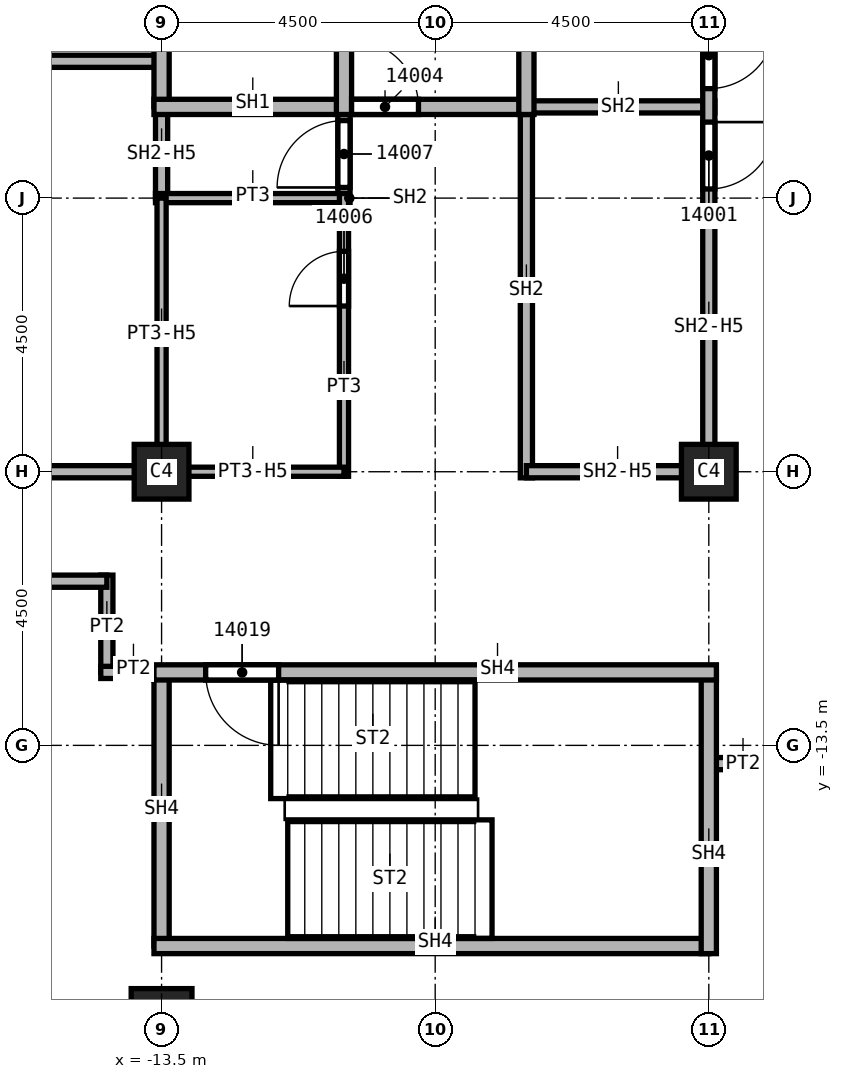
"""IFC4 building model, lengths in metres.
Left out: names, types, materials, properties, quantities, classifications, styles, units other than length and angle.
Written with IfcOpenShell. Run it as: python <this file> out.ifc"""

import sys

from ifc_helpers import new_model, si_unit, direction, frame, frame_2d, origin, origin_2d, place, context, subcontext, project, spatial, rectangle, extrude, element, fill, save


model = new_model("IFC4")
c1 = context("Model", 3, precision=1e-05, world=origin(), true_north=direction((0.0, 1.0)))
c2 = subcontext(c1, "Body", "Model", "MODEL_VIEW")
j1 = project(units=[si_unit("LENGTHUNIT", "METRE"), si_unit("PLANEANGLEUNIT", "RADIAN")], contexts=[c1])
p1 = place(None, origin())
s1 = spatial("IfcSite", under=j1, at=p1, CompositionType="ELEMENT")
p2 = place(p1, origin())
s2 = spatial("IfcBuilding", under=s1, at=p2, CompositionType="ELEMENT")
p3 = place(p2, frame((0.0, 0.0, 224.0)))
s3 = spatial("IfcBuildingStorey", under=s2, at=p3, CompositionType="ELEMENT", Elevation=224.0)
p4 = place(p3, frame((-13.5, -18.0, 0.0), z_axis=(0.0, 0.0, 1.0), x_axis=(1.0, 0.0, 0.0)))
e1 = element("IfcColumn", 1, at=p4, inside=s3, PredefinedType="COLUMN", context=c2, shape_type="SweptSolid", body=[
    extrude(rectangle(XDim=1.0, YDim=1.0, at=origin_2d()), origin(), (0.0, 0.0, 1.0), 3.72),
])
for number, where, z_axis, x_axis in (
    (2, (-4.5, -9.0, 0.0), (0.0, 0.0, 1.0), (1.0, 0.0, 0.0)),
    (3, (-13.5, -9.0, 0.0), (0.0, 0.0, 1.0), (1.0, 0.0, 0.0)),
):
    element("IfcColumn", number, at=place(p3, frame(where, z_axis=z_axis, x_axis=x_axis)), inside=s3, PredefinedType="COLUMN", context=c2, shape_type="SweptSolid", body=[
        extrude(rectangle(XDim=0.9, YDim=0.9, at=origin_2d()), origin(), (0.0, 0.0, 1.0), 3.72),
    ])
for number, where, z_axis, x_axis in (
    (4, (-18.0, -9.0, 0.0), (0.0, 0.0, 1.0), (1.0, 0.0, 0.0)),
    (5, (-18.0, -2.25, 0.0), (0.0, 0.0, 1.0), (1.0, 0.0, 0.0)),
):
    element("IfcWall", number, at=place(p3, frame(where, z_axis=z_axis, x_axis=x_axis)), inside=s3, PredefinedType="PARTITIONING", context=c2, shape_type="SweptSolid", body=[
        extrude(rectangle(XDim=4.5, YDim=0.2, at=frame_2d((2.25, 0.0))), origin(), (0.0, 0.0, 1.0), 3.72),
    ])
p5 = place(p3, frame((-14.4, -12.3, 0.0), z_axis=(0.0, 0.0, 1.0), x_axis=(0.0, 1.0, 0.0)))
e6 = element("IfcWall", 6, at=p5, inside=s3, PredefinedType="PARTITIONING", context=c2, shape_type="SweptSolid", body=[
    extrude(rectangle(XDim=1.6, YDim=0.2, at=frame_2d((0.8, 0.0))), origin(), (0.0, 0.0, 1.0), 3.72),
])
p6 = place(p3, frame((-14.4, -10.8, 0.0), z_axis=(0.0, 0.0, 1.0), x_axis=(-1.0, 0.0, 0.0)))
e7 = element("IfcWall", 7, at=p6, inside=s3, PredefinedType="PARTITIONING", context=c2, shape_type="SweptSolid", body=[
    extrude(rectangle(XDim=3.6, YDim=0.2, at=frame_2d((1.8, 0.0))), origin(), (0.0, 0.0, 1.0), 3.72),
])
p7 = place(p3, frame((-13.375, -12.3, 0.0), z_axis=(0.0, 0.0, 1.0), x_axis=(-1.0, 0.0, 0.0)))
e8 = element("IfcWall", 8, at=p7, inside=s3, PredefinedType="PARTITIONING", context=c2, shape_type="SweptSolid", body=[
    extrude(rectangle(XDim=1.125, YDim=0.2, at=frame_2d((0.562, 0.0))), origin(), (0.0, 0.0, 1.0), 3.72),
])
p8 = place(p3, frame((-3.5, -13.8, 0.0), z_axis=(0.0, 0.0, 1.0), x_axis=(-1.0, 0.0, 0.0)))
e9 = element("IfcWall", 9, at=p8, inside=s3, PredefinedType="PARTITIONING", context=c2, shape_type="SweptSolid", body=[
    extrude(rectangle(XDim=1.0, YDim=0.2, at=frame_2d((0.5, 0.0))), origin(), (0.0, 0.0, 1.0), 3.72),
])
p9 = place(p3, frame((-13.5, -4.5, 0.0), z_axis=(0.0, 0.0, 1.0), x_axis=(0.0, 1.0, 0.0)))
e10 = element("IfcWall", 10, at=p9, inside=s3, PredefinedType="SOLIDWALL", context=c2, shape_type="SweptSolid", body=[
    extrude(rectangle(XDim=1.5, YDim=0.2, at=frame_2d((0.75, 0.0))), origin(), (0.0, 0.0, 1.0), 2.958),
])
p10 = place(p3, frame((-10.5, -4.575, 0.0), z_axis=(0.0, 0.0, 1.0), x_axis=(0.0, 1.0, 0.0)))
e11 = element("IfcWall", 11, at=p10, inside=s3, PredefinedType="SOLIDWALL", context=c2, shape_type="SweptSolid", body=[
    extrude(rectangle(XDim=1.7, YDim=0.2, at=frame_2d((0.85, 0.0))), origin(), (0.0, 0.0, 1.0), 3.72),
])
p11 = place(p10, frame((0.25, 0.0, 0.0)))
e12 = element("IfcOpeningElement", 12, at=p11, cuts=e11, PredefinedType="OPENING", context=c2, shape_type="SweptSolid", body=[
    extrude(rectangle(XDim=1.1, YDim=2.1, at=frame_2d((0.55, 1.05))), frame((0.0, 0.1, 0.0), z_axis=(0.0, -1.0, 0.0), x_axis=(1.0, 0.0, 0.0)), (0.0, 0.0, 1.0), 0.2),
])
p12 = place(p3, frame((-7.625, -3.0, 0.0), z_axis=(0.0, 0.0, 1.0), x_axis=(1.0, 0.0, 0.0)))
e13 = element("IfcWall", 13, at=p12, inside=s3, PredefinedType="SOLIDWALL", context=c2, shape_type="SweptSolid", body=[
    extrude(rectangle(XDim=3.225, YDim=0.2, at=frame_2d((1.613, 0.0))), origin(), (0.0, 0.0, 1.0), 3.72),
])
p13 = place(p3, frame((-7.5, -9.1, 0.0), z_axis=(0.0, 0.0, 1.0), x_axis=(0.0, 1.0, 0.0)))
e14 = element("IfcWall", 14, at=p13, inside=s3, PredefinedType="SOLIDWALL", context=c2, shape_type="SweptSolid", body=[
    extrude(rectangle(XDim=6.225, YDim=0.2, at=frame_2d((3.113, 0.0))), origin(), (0.0, 0.0, 1.0), 3.72),
])
p14 = place(p3, frame((-4.5, -9.0, 0.0), z_axis=(0.0, 0.0, 1.0), x_axis=(-1.0, 0.0, 0.0)))
e15 = element("IfcWall", 15, at=p14, inside=s3, PredefinedType="SOLIDWALL", context=c2, shape_type="SweptSolid", body=[
    extrude(rectangle(XDim=3.0, YDim=0.2, at=frame_2d((1.5, 0.0))), origin(), (0.0, 0.0, 1.0), 2.958),
])
p15 = place(p3, frame((-4.5, 0.0, 0.0), z_axis=(0.0, 0.0, 1.0), x_axis=(0.0, -1.0, 0.0)))
e16 = element("IfcWall", 16, at=p15, inside=s3, PredefinedType="SOLIDWALL", context=c2, shape_type="SweptSolid", body=[
    extrude(rectangle(XDim=9.1, YDim=0.2, at=frame_2d((4.55, 0.0))), origin(), (0.0, 0.0, 1.0), 2.958),
])
p16 = place(p15, frame((3.25, 0.0, 0.0)))
e17 = element("IfcOpeningElement", 17, at=p16, cuts=e16, PredefinedType="OPENING", context=c2, shape_type="SweptSolid", body=[
    extrude(rectangle(XDim=1.1, YDim=2.1, at=frame_2d((0.55, 1.05))), frame((0.0, 0.1, 0.0), z_axis=(0.0, -1.0, 0.0), x_axis=(1.0, 0.0, 0.0)), (0.0, 0.0, 1.0), 0.2),
])
p17 = place(p15, frame((1.6, 0.0, 0.0)))
e18 = element("IfcOpeningElement", 18, at=p17, cuts=e16, PredefinedType="OPENING", context=c2, shape_type="SweptSolid", body=[
    extrude(rectangle(XDim=1.1, YDim=2.1, at=frame_2d((0.55, 1.05))), frame((0.0, 0.1, 0.0), z_axis=(0.0, -1.0, 0.0), x_axis=(1.0, 0.0, 0.0)), (0.0, 0.0, 1.0), 0.2),
])
p18 = place(p3, frame((-13.5, -3.0, 0.0), z_axis=(0.0, 0.0, 1.0), x_axis=(0.0, 1.0, 0.0)))
e19 = element("IfcWall", 19, at=p18, inside=s3, PredefinedType="SOLIDWALL", context=c2, shape_type="SweptSolid", body=[
    extrude(rectangle(XDim=6.0, YDim=0.25, at=frame_2d((3.0, 0.0))), origin(), (0.0, 0.0, 1.0), 2.958),
])
p19 = place(p3, frame((-13.625, -3.0, 0.0), z_axis=(0.0, 0.0, 1.0), x_axis=(1.0, 0.0, 0.0)))
e20 = element("IfcWall", 20, at=p19, inside=s3, PredefinedType="SOLIDWALL", context=c2, shape_type="SweptSolid", body=[
    extrude(rectangle(XDim=6.125, YDim=0.25, at=frame_2d((3.062, 0.0))), origin(), (0.0, 0.0, 1.0), 3.72),
])
p20 = place(p19, frame((3.25, 0.0, 0.0)))
e21 = element("IfcOpeningElement", 21, at=p20, cuts=e20, PredefinedType="OPENING", context=c2, shape_type="SweptSolid", body=[
    extrude(rectangle(XDim=1.1, YDim=2.1, at=frame_2d((0.55, 1.05))), frame((0.0, 0.125, 0.0), z_axis=(0.0, -1.0, 0.0), x_axis=(1.0, 0.0, 0.0)), (0.0, 0.0, 1.0), 0.25),
])
p21 = place(p3, frame((-10.5, -3.125, 0.0), z_axis=(0.0, 0.0, 1.0), x_axis=(0.0, 1.0, 0.0)))
e22 = element("IfcWall", 22, at=p21, inside=s3, PredefinedType="SOLIDWALL", context=c2, shape_type="SweptSolid", body=[
    extrude(rectangle(XDim=6.25, YDim=0.25, at=frame_2d((3.125, 0.0))), origin(), (0.0, 0.0, 1.0), 3.72),
])
p22 = place(p21, frame((1.075, 0.0, 0.0)))
e23 = element("IfcOpeningElement", 23, at=p22, cuts=e22, PredefinedType="OPENING", context=c2, shape_type="SweptSolid", body=[
    extrude(rectangle(XDim=1.1, YDim=2.1, at=frame_2d((0.55, 1.05))), frame((0.0, 0.125, 0.0), z_axis=(0.0, -1.0, 0.0), x_axis=(1.0, 0.0, 0.0)), (0.0, 0.0, 1.0), 0.25),
])
p23 = place(p21, frame((4.075, 0.0, 0.0)))
e24 = element("IfcOpeningElement", 24, at=p23, cuts=e22, PredefinedType="OPENING", context=c2, shape_type="SweptSolid", body=[
    extrude(rectangle(XDim=1.1, YDim=2.1, at=frame_2d((0.55, 1.05))), frame((0.0, 0.125, 0.0), z_axis=(0.0, -1.0, 0.0), x_axis=(1.0, 0.0, 0.0)), (0.0, 0.0, 1.0), 0.25),
])
p24 = place(p3, frame((-7.5, -3.125, 0.0), z_axis=(0.0, 0.0, 1.0), x_axis=(0.0, 1.0, 0.0)))
e25 = element("IfcWall", 25, at=p24, inside=s3, PredefinedType="SOLIDWALL", context=c2, shape_type="SweptSolid", body=[
    extrude(rectangle(XDim=9.125, YDim=0.25, at=frame_2d((4.562, 0.0))), origin(), (0.0, 0.0, 1.0), 3.72),
])
p25 = place(p3, frame((-13.5, -16.8, 0.0), z_axis=(0.0, 0.0, 1.0), x_axis=(0.0, 1.0, 0.0)))
e26 = element("IfcWall", 26, at=p25, inside=s3, PredefinedType="SOLIDWALL", context=c2, shape_type="SweptSolid", body=[
    extrude(rectangle(XDim=4.5, YDim=0.25, at=frame_2d((2.25, 0.0))), origin(), (0.0, 0.0, 1.0), 3.72),
])
p26 = place(p3, frame((-4.5, -16.8, 0.0), z_axis=(0.0, 0.0, 1.0), x_axis=(-1.0, 0.0, 0.0)))
e27 = element("IfcWall", 27, at=p26, inside=s3, PredefinedType="SOLIDWALL", context=c2, shape_type="SweptSolid", body=[
    extrude(rectangle(XDim=9.125, YDim=0.25, at=frame_2d((4.562, 0.0))), origin(), (0.0, 0.0, 1.0), 3.72),
])
p27 = place(p3, frame((-4.5, -12.3, 0.0), z_axis=(0.0, 0.0, 1.0), x_axis=(0.0, -1.0, 0.0)))
e28 = element("IfcWall", 28, at=p27, inside=s3, PredefinedType="SOLIDWALL", context=c2, shape_type="SweptSolid", body=[
    extrude(rectangle(XDim=4.625, YDim=0.25, at=frame_2d((2.312, 0.0))), origin(), (0.0, 0.0, 1.0), 3.72),
])
p28 = place(p3, frame((-4.375, -12.3, 0.0), z_axis=(0.0, 0.0, 1.0), x_axis=(-1.0, 0.0, 0.0)))
e29 = element("IfcWall", 29, at=p28, inside=s3, PredefinedType="SOLIDWALL", context=c2, shape_type="SweptSolid", body=[
    extrude(rectangle(XDim=9.25, YDim=0.25, at=frame_2d((4.625, 0.0))), origin(), (0.0, 0.0, 1.0), 3.72),
])
p29 = place(p28, frame((7.2, 0.0, 0.0)))
e30 = element("IfcOpeningElement", 30, at=p29, cuts=e29, PredefinedType="OPENING", context=c2, shape_type="SweptSolid", body=[
    extrude(rectangle(XDim=1.2, YDim=2.1, at=frame_2d((0.6, 1.05))), frame((0.0, 0.125, 0.0), z_axis=(0.0, -1.0, 0.0), x_axis=(1.0, 0.0, 0.0)), (0.0, 0.0, 1.0), 0.25),
])
p30 = place(p3, frame((-13.6, -4.5, 0.0), z_axis=(0.0, 0.0, 1.0), x_axis=(1.0, 0.0, 0.0)))
e31 = element("IfcWall", 31, at=p30, inside=s3, PredefinedType="PARTITIONING", context=c2, shape_type="SweptSolid", body=[
    extrude(rectangle(XDim=3.1, YDim=0.15, at=frame_2d((1.55, 0.0))), origin(), (0.0, 0.0, 1.0), 3.72),
])
p31 = place(p3, frame((-13.5, -9.1, 0.0), z_axis=(0.0, 0.0, 1.0), x_axis=(0.0, 1.0, 0.0)))
e32 = element("IfcWall", 32, at=p31, inside=s3, PredefinedType="PARTITIONING", context=c2, shape_type="SweptSolid", body=[
    extrude(rectangle(XDim=4.6, YDim=0.15, at=frame_2d((2.3, 0.0))), origin(), (0.0, 0.0, 1.0), 2.958),
])
p32 = place(p3, frame((-10.5, -9.075, 0.0), z_axis=(0.0, 0.0, 1.0), x_axis=(0.0, 1.0, 0.0)))
e33 = element("IfcWall", 33, at=p32, inside=s3, PredefinedType="PARTITIONING", context=c2, shape_type="SweptSolid", body=[
    extrude(rectangle(XDim=4.65, YDim=0.15, at=frame_2d((2.325, 0.0))), origin(), (0.0, 0.0, 1.0), 3.72),
])
p33 = place(p32, frame((2.8, 0.0, 0.0)))
e34 = element("IfcOpeningElement", 34, at=p33, cuts=e33, PredefinedType="OPENING", context=c2, shape_type="SweptSolid", body=[
    extrude(rectangle(XDim=0.9, YDim=2.1, at=frame_2d((0.45, 1.05))), frame((0.0, 0.075, 0.0), z_axis=(0.0, -1.0, 0.0), x_axis=(1.0, 0.0, 0.0)), (0.0, 0.0, 1.0), 0.15),
])
p34 = place(p3, frame((-10.5, -9.0, 0.0), z_axis=(0.0, 0.0, 1.0), x_axis=(-1.0, 0.0, 0.0)))
e35 = element("IfcWall", 35, at=p34, inside=s3, PredefinedType="PARTITIONING", context=c2, shape_type="SweptSolid", body=[
    extrude(rectangle(XDim=3.075, YDim=0.15, at=frame_2d((1.538, 0.0))), origin(), (0.0, 0.0, 1.0), 2.958),
])
p35 = place(p16, origin())
e36 = element("IfcDoor", 36, at=p35, inside=s3, OperationType="SINGLE_SWING_RIGHT", PredefinedType="DOOR", context=c2, shape_type="SweptSolid", body=[
    extrude(rectangle(XDim=1.1, YDim=2.1, at=frame_2d((0.55, 1.05))), frame((0.0, 0.025, 0.0), z_axis=(0.0, -1.0, 0.0), x_axis=(1.0, 0.0, 0.0)), (0.0, 0.0, 1.0), 0.05),
])
fill(e17, e36)
p36 = place(p17, origin())
e37 = element("IfcDoor", 37, at=p36, inside=s3, OperationType="SINGLE_SWING_LEFT", PredefinedType="DOOR", context=c2, shape_type="SweptSolid", body=[
    extrude(rectangle(XDim=1.1, YDim=2.1, at=frame_2d((0.55, 1.05))), frame((0.0, 0.025, 0.0), z_axis=(0.0, -1.0, 0.0), x_axis=(1.0, 0.0, 0.0)), (0.0, 0.0, 1.0), 0.05),
])
fill(e18, e37)
p37 = place(p20, origin())
e38 = element("IfcDoor", 38, at=p37, inside=s3, OperationType="SINGLE_SWING_LEFT", PredefinedType="DOOR", context=c2, shape_type="SweptSolid", body=[
    extrude(rectangle(XDim=1.1, YDim=2.1, at=frame_2d((0.55, 1.05))), frame((0.0, 0.025, 0.0), z_axis=(0.0, -1.0, 0.0), x_axis=(1.0, 0.0, 0.0)), (0.0, 0.0, 1.0), 0.05),
])
fill(e21, e38)
p38 = place(p33, origin())
e39 = element("IfcDoor", 39, at=p38, inside=s3, OperationType="SINGLE_SWING_LEFT", PredefinedType="DOOR", context=c2, shape_type="SweptSolid", body=[
    extrude(rectangle(XDim=0.9, YDim=2.1, at=frame_2d((0.45, 1.05))), frame((0.0, 0.025, 0.0), z_axis=(0.0, -1.0, 0.0), x_axis=(1.0, 0.0, 0.0)), (0.0, 0.0, 1.0), 0.05),
])
fill(e34, e39)
p39 = place(p11, origin())
e40 = element("IfcDoor", 40, at=p39, inside=s3, OperationType="SINGLE_SWING_RIGHT", PredefinedType="DOOR", context=c2, shape_type="SweptSolid", body=[
    extrude(rectangle(XDim=1.1, YDim=2.1, at=frame_2d((0.55, 1.05))), frame((0.0, 0.025, 0.0), z_axis=(0.0, -1.0, 0.0), x_axis=(1.0, 0.0, 0.0)), (0.0, 0.0, 1.0), 0.05),
])
fill(e12, e40)
p40 = place(p29, origin())
e41 = element("IfcDoor", 41, at=p40, inside=s3, OperationType="SINGLE_SWING_RIGHT", PredefinedType="DOOR", context=c2, shape_type="SweptSolid", body=[
    extrude(rectangle(XDim=1.2, YDim=2.1, at=frame_2d((0.6, 1.05))), frame((0.0, 0.025, 0.0), z_axis=(0.0, -1.0, 0.0), x_axis=(1.0, 0.0, 0.0)), (0.0, 0.0, 1.0), 0.05),
])
fill(e30, e41)
save(model, sys.argv[1])
